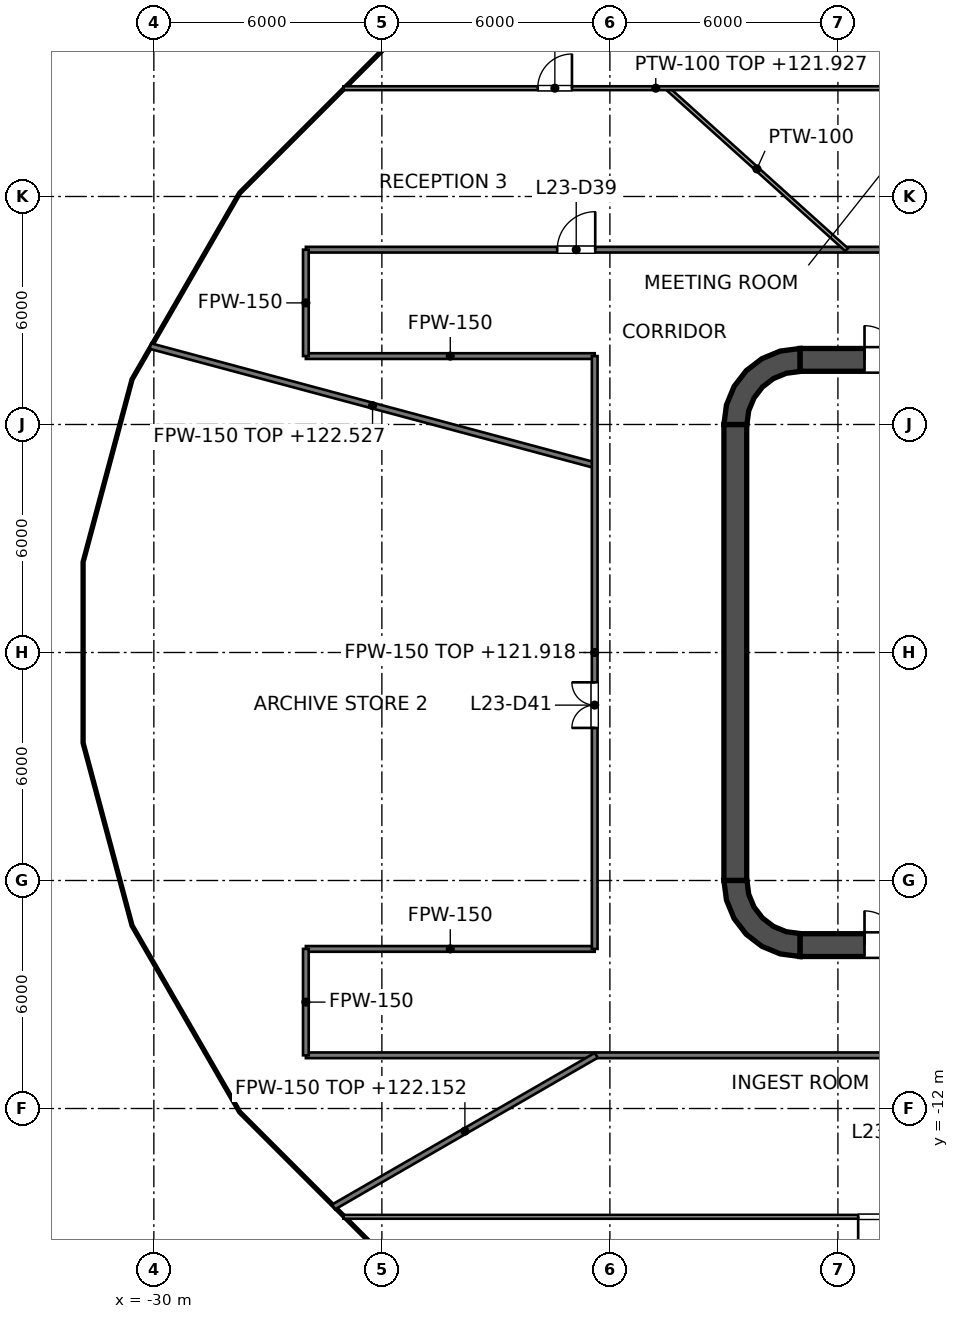
"""IFC4 building model, lengths in metres.
Left out: names, types, materials, properties, quantities, classifications, styles, units other than length and angle.
Written with IfcOpenShell. Run it as: python <this file> out.ifc"""

import sys

from ifc_helpers import new_model, si_unit, direction, frame, frame_2d, origin, place, context, subcontext, project, spatial, polyline, rectangle, outline, extrude, element, fill, save


model = new_model("IFC4")
c1 = context("Model", 3, precision=1e-05, world=origin(), true_north=direction((0.0, 1.0)))
c2 = subcontext(c1, "Body", "Model", "MODEL_VIEW")
j1 = project(units=[si_unit("LENGTHUNIT", "METRE"), si_unit("PLANEANGLEUNIT", "RADIAN")], contexts=[c1])
p1 = place(None, origin())
s1 = spatial("IfcSite", under=j1, at=p1, CompositionType="ELEMENT")
p2 = place(p1, origin())
s2 = spatial("IfcBuilding", under=s1, at=p2, CompositionType="ELEMENT")
p3 = place(p2, frame((0.0, 0.0, 118.8)))
s3 = spatial("IfcBuildingStorey", under=s2, at=p3, CompositionType="ELEMENT", Elevation=118.8)
p4 = place(p3, frame((-13.0, 7.7, 0.0), z_axis=(0.0, 0.0, 1.0), x_axis=(1.0, 0.0, 0.0)))
e1 = element("IfcWall", 1, at=p4, inside=s3, PredefinedType="SHEAR", context=c2, shape_type="SweptSolid", body=[
    extrude(rectangle(XDim=26.0, YDim=0.6, at=frame_2d((13.0, 0.0))), origin(), (0.0, 0.0, 1.0), 4.2),
])
p5 = place(p4, frame((1.7, 0.0, 0.0)))
e2 = element("IfcOpeningElement", 2, at=p5, cuts=e1, PredefinedType="OPENING", context=c2, shape_type="SweptSolid", body=[
    extrude(rectangle(XDim=1.8, YDim=2.1, at=frame_2d((0.9, 1.05))), frame((0.0, 0.3, 0.0), z_axis=(0.0, -1.0, 0.0), x_axis=(1.0, 0.0, 0.0)), (0.0, 0.0, 1.0), 0.6),
])
p6 = place(p4, frame((22.5, 0.0, 0.0)))
e3 = element("IfcOpeningElement", 3, at=p6, cuts=e1, PredefinedType="OPENING", context=c2, shape_type="SweptSolid", body=[
    extrude(rectangle(XDim=1.8, YDim=2.1, at=frame_2d((0.9, 1.05))), frame((0.0, 0.3, 0.0), z_axis=(0.0, -1.0, 0.0), x_axis=(1.0, 0.0, 0.0)), (0.0, 0.0, 1.0), 0.6),
])
p7 = place(p3, frame((-13.0, -7.7, 0.0), z_axis=(0.0, 0.0, 1.0), x_axis=(1.0, 0.0, 0.0)))
e4 = element("IfcWall", 4, at=p7, inside=s3, PredefinedType="SHEAR", context=c2, shape_type="SweptSolid", body=[
    extrude(rectangle(XDim=26.0, YDim=0.6, at=frame_2d((13.0, 0.0))), origin(), (0.0, 0.0, 1.0), 4.2),
])
p8 = place(p7, frame((1.7, 0.0, 0.0)))
e5 = element("IfcOpeningElement", 5, at=p8, cuts=e4, PredefinedType="OPENING", context=c2, shape_type="SweptSolid", body=[
    extrude(rectangle(XDim=1.8, YDim=2.1, at=frame_2d((0.9, 1.05))), frame((0.0, 0.3, 0.0), z_axis=(0.0, -1.0, 0.0), x_axis=(1.0, 0.0, 0.0)), (0.0, 0.0, 1.0), 0.6),
])
p9 = place(p7, frame((22.5, 0.0, 0.0)))
e6 = element("IfcOpeningElement", 6, at=p9, cuts=e4, PredefinedType="OPENING", context=c2, shape_type="SweptSolid", body=[
    extrude(rectangle(XDim=1.8, YDim=2.1, at=frame_2d((0.9, 1.05))), frame((0.0, 0.3, 0.0), z_axis=(0.0, -1.0, 0.0), x_axis=(1.0, 0.0, 0.0)), (0.0, 0.0, 1.0), 0.6),
])
p10 = place(p3, frame((-14.7, -6.0, 0.0), z_axis=(0.0, 0.0, 1.0), x_axis=(0.0, 1.0, 0.0)))
e7 = element("IfcWall", 7, at=p10, inside=s3, PredefinedType="SHEAR", context=c2, shape_type="SweptSolid", body=[
    extrude(rectangle(XDim=12.0, YDim=0.6, at=frame_2d((6.0, 0.0))), origin(), (0.0, 0.0, 1.0), 4.2),
])
p11 = place(p3, origin())
e8 = element("IfcWall", 8, at=p11, inside=s3, PredefinedType="SHEAR", context=c2, shape_type="SweptSolid", body=[
    extrude(outline(polyline([(-15.0, 6.0), (-14.395, 6.0), (-14.347, 6.361), (-14.208, 6.698), (-13.986, 6.986), (-13.698, 7.208), (-13.361, 7.347), (-13.0, 7.395), (-13.0, 8.0), (-13.518, 7.932), (-14.0, 7.732), (-14.414, 7.414), (-14.732, 7.0), (-14.932, 6.518), (-15.0, 6.0)])), origin(), (0.0, 0.0, 1.0), 4.2),
])
e9 = element("IfcWall", 9, at=p11, inside=s3, PredefinedType="SHEAR", context=c2, shape_type="SweptSolid", body=[
    extrude(outline(polyline([(-13.0, -8.0), (-13.0, -7.395), (-13.361, -7.347), (-13.698, -7.208), (-13.986, -6.986), (-14.208, -6.698), (-14.347, -6.361), (-14.395, -6.0), (-15.0, -6.0), (-14.932, -6.518), (-14.732, -7.0), (-14.414, -7.414), (-14.0, -7.732), (-13.518, -7.932), (-13.0, -8.0)])), origin(), (0.0, 0.0, 1.0), 4.2),
])
p12 = place(p3, frame((-11.8, -7.4, 0.0), z_axis=(0.0, 0.0, 1.0), x_axis=(0.0, 1.0, 0.0)))
e10 = element("IfcWall", 10, at=p12, inside=s3, PredefinedType="SOLIDWALL", context=c2, shape_type="SweptSolid", body=[
    extrude(rectangle(XDim=14.8, YDim=0.4, at=frame_2d((7.4, 0.0))), origin(), (0.0, 0.0, 1.0), 4.05),
])
p13 = place(p12, frame((11.2, 0.0, 0.0)))
e11 = element("IfcOpeningElement", 11, at=p13, cuts=e10, PredefinedType="OPENING", context=c2, shape_type="SweptSolid", body=[
    extrude(rectangle(XDim=1.1, YDim=2.1, at=frame_2d((0.55, 1.05))), frame((0.0, 0.2, 0.0), z_axis=(0.0, -1.0, 0.0), x_axis=(1.0, 0.0, 0.0)), (0.0, 0.0, 1.0), 0.4),
])
p14 = place(p12, frame((8.3, 0.0, 0.0)))
e12 = element("IfcOpeningElement", 12, at=p14, cuts=e10, PredefinedType="OPENING", context=c2, shape_type="SweptSolid", body=[
    extrude(rectangle(XDim=1.1, YDim=2.1, at=frame_2d((0.55, 1.05))), frame((0.0, 0.2, 0.0), z_axis=(0.0, -1.0, 0.0), x_axis=(1.0, 0.0, 0.0)), (0.0, 0.0, 1.0), 0.4),
])
p15 = place(p12, frame((5.4, 0.0, 0.0)))
e13 = element("IfcOpeningElement", 13, at=p15, cuts=e10, PredefinedType="OPENING", context=c2, shape_type="SweptSolid", body=[
    extrude(rectangle(XDim=1.1, YDim=2.1, at=frame_2d((0.55, 1.05))), frame((0.0, 0.2, 0.0), z_axis=(0.0, -1.0, 0.0), x_axis=(1.0, 0.0, 0.0)), (0.0, 0.0, 1.0), 0.4),
])
p16 = place(p12, frame((13.552, 0.0, 0.0)))
e14 = element("IfcOpeningElement", 14, at=p16, cuts=e10, PredefinedType="OPENING", context=c2, shape_type="SweptSolid", body=[
    extrude(rectangle(XDim=0.9, YDim=2.1, at=frame_2d((0.45, 1.05))), frame((0.0, 0.2, 0.0), z_axis=(0.0, -1.0, 0.0), x_axis=(1.0, 0.0, 0.0)), (0.0, 0.0, 1.0), 0.4),
])
p17 = place(p12, frame((0.347, 0.0, 0.0)))
e15 = element("IfcOpeningElement", 15, at=p17, cuts=e10, PredefinedType="OPENING", context=c2, shape_type="SweptSolid", body=[
    extrude(rectangle(XDim=0.9, YDim=2.1, at=frame_2d((0.45, 1.05))), frame((0.0, 0.2, 0.0), z_axis=(0.0, -1.0, 0.0), x_axis=(1.0, 0.0, 0.0)), (0.0, 0.0, 1.0), 0.4),
])
e16 = element("IfcWall", 16, at=p11, inside=s3, PredefinedType="SOLIDWALL", context=c2, shape_type="SweptSolid", body=[
    extrude(outline(polyline([(-12.0, -5.925), (-12.0, -5.675), (-14.15, -5.675), (-14.15, -3.025), (-12.0, -3.025), (-12.0, -2.775), (-14.15, -2.775), (-14.15, -0.125), (-12.0, -0.125), (-12.0, 0.125), (-14.15, 0.125), (-14.15, 2.775), (-12.0, 2.775), (-12.0, 3.025), (-14.15, 3.025), (-14.15, 5.675), (-12.0, 5.675), (-12.0, 5.925), (-14.15, 5.925), (-14.4, 5.925), (-14.4, 5.675), (-14.4, 3.025), (-14.4, 2.775), (-14.4, 0.125), (-14.4, -0.125), (-14.4, -2.775), (-14.4, -3.025), (-14.4, -5.675), (-14.4, -5.925), (-14.15, -5.925), (-12.0, -5.925)])), origin(), (0.0, 0.0, 1.0), 4.05),
])
p18 = place(p3, frame((-30.091, 8.063, 0.0), z_axis=(0.0, 0.0, 1.0), x_axis=(0.965917167339, -0.258851358583, 0.0)))
e17 = element("IfcWall", 17, at=p18, inside=s3, PredefinedType="PARTITIONING", context=c2, shape_type="SweptSolid", body=[
    extrude(rectangle(XDim=12.104, YDim=0.15, at=frame_2d((6.052, 0.0))), origin(), (0.0, 0.0, 1.0), 3.727),
])
p19 = place(p3, frame((-26.0, -10.6, 0.0), z_axis=(0.0, 0.0, 1.0), x_axis=(1.0, 0.0, 0.0)))
e18 = element("IfcWall", 18, at=p19, inside=s3, PredefinedType="PARTITIONING", context=c2, shape_type="SweptSolid", body=[
    extrude(rectangle(XDim=52.0, YDim=0.15, at=frame_2d((26.0, 0.0))), origin(), (0.0, 0.0, 1.0), 3.127),
])
p20 = place(p19, frame((17.62, 0.0, 0.0)))
e19 = element("IfcOpeningElement", 19, at=p20, cuts=e18, PredefinedType="OPENING", context=c2, shape_type="SweptSolid", body=[
    extrude(rectangle(XDim=1.2, YDim=2.1, at=frame_2d((0.6, 1.05))), frame((0.0, 0.075, 0.0), z_axis=(0.0, -1.0, 0.0), x_axis=(1.0, 0.0, 0.0)), (0.0, 0.0, 1.0), 0.15),
])
p21 = place(p19, frame((30.25, 0.0, 0.0)))
e20 = element("IfcOpeningElement", 20, at=p21, cuts=e18, PredefinedType="OPENING", context=c2, shape_type="SweptSolid", body=[
    extrude(rectangle(XDim=1.0, YDim=2.1, at=frame_2d((0.5, 1.05))), frame((0.0, 0.075, 0.0), z_axis=(0.0, -1.0, 0.0), x_axis=(1.0, 0.0, 0.0)), (0.0, 0.0, 1.0), 0.15),
])
p22 = place(p19, frame((34.989, 0.0, 0.0)))
e21 = element("IfcOpeningElement", 21, at=p22, cuts=e18, PredefinedType="OPENING", context=c2, shape_type="SweptSolid", body=[
    extrude(rectangle(XDim=1.0, YDim=2.1, at=frame_2d((0.5, 1.05))), frame((0.0, 0.075, 0.0), z_axis=(0.0, -1.0, 0.0), x_axis=(1.0, 0.0, 0.0)), (0.0, 0.0, 1.0), 0.15),
])
p23 = place(p19, frame((44.658, 0.0, 0.0)))
e22 = element("IfcOpeningElement", 22, at=p23, cuts=e18, PredefinedType="OPENING", context=c2, shape_type="SweptSolid", body=[
    extrude(rectangle(XDim=1.0, YDim=2.1, at=frame_2d((0.5, 1.05))), frame((0.0, 0.075, 0.0), z_axis=(0.0, -1.0, 0.0), x_axis=(1.0, 0.0, 0.0)), (0.0, 0.0, 1.0), 0.15),
])
for number, where, z_axis, x_axis in (
    (23, (-26.0, -7.8, 0.0), (0.0, 0.0, 1.0), (1.0, 0.0, 0.0)),
    (24, (-26.0, 7.8, 0.0), (0.0, 0.0, 1.0), (1.0, 0.0, 0.0)),
):
    element("IfcWall", number, at=place(p3, frame(where, z_axis=z_axis, x_axis=x_axis)), inside=s3, PredefinedType="PARTITIONING", context=c2, shape_type="SweptSolid", body=[
        extrude(rectangle(XDim=7.6, YDim=0.15, at=frame_2d((3.8, 0.0))), origin(), (0.0, 0.0, 1.0), 3.276),
    ])
p24 = place(p3, frame((-26.0, 10.6, 0.0), z_axis=(0.0, 0.0, 1.0), x_axis=(1.0, 0.0, 0.0)))
e25 = element("IfcWall", 25, at=p24, inside=s3, PredefinedType="PARTITIONING", context=c2, shape_type="SweptSolid", body=[
    extrude(rectangle(XDim=52.0, YDim=0.15, at=frame_2d((26.0, 0.0))), origin(), (0.0, 0.0, 1.0), 3.127),
])
p25 = place(p24, frame((44.052, 0.0, 0.0)))
e26 = element("IfcOpeningElement", 26, at=p25, cuts=e25, PredefinedType="OPENING", context=c2, shape_type="SweptSolid", body=[
    extrude(rectangle(XDim=1.2, YDim=2.1, at=frame_2d((0.6, 1.05))), frame((0.0, 0.075, 0.0), z_axis=(0.0, -1.0, 0.0), x_axis=(1.0, 0.0, 0.0)), (0.0, 0.0, 1.0), 0.15),
])
p26 = place(p24, frame((35.166, 0.0, 0.0)))
e27 = element("IfcOpeningElement", 27, at=p26, cuts=e25, PredefinedType="OPENING", context=c2, shape_type="SweptSolid", body=[
    extrude(rectangle(XDim=1.0, YDim=2.1, at=frame_2d((0.5, 1.05))), frame((0.0, 0.075, 0.0), z_axis=(0.0, -1.0, 0.0), x_axis=(1.0, 0.0, 0.0)), (0.0, 0.0, 1.0), 0.15),
])
p27 = place(p24, frame((32.68, 0.0, 0.0)))
e28 = element("IfcOpeningElement", 28, at=p27, cuts=e25, PredefinedType="OPENING", context=c2, shape_type="SweptSolid", body=[
    extrude(rectangle(XDim=1.0, YDim=2.1, at=frame_2d((0.5, 1.05))), frame((0.0, 0.075, 0.0), z_axis=(0.0, -1.0, 0.0), x_axis=(1.0, 0.0, 0.0)), (0.0, 0.0, 1.0), 0.15),
])
p28 = place(p24, frame((28.51, 0.0, 0.0)))
e29 = element("IfcOpeningElement", 29, at=p28, cuts=e25, PredefinedType="OPENING", context=c2, shape_type="SweptSolid", body=[
    extrude(rectangle(XDim=1.0, YDim=2.1, at=frame_2d((0.5, 1.05))), frame((0.0, 0.075, 0.0), z_axis=(0.0, -1.0, 0.0), x_axis=(1.0, 0.0, 0.0)), (0.0, 0.0, 1.0), 0.15),
])
p29 = place(p24, frame((22.49, 0.0, 0.0)))
e30 = element("IfcOpeningElement", 30, at=p29, cuts=e25, PredefinedType="OPENING", context=c2, shape_type="SweptSolid", body=[
    extrude(rectangle(XDim=1.0, YDim=2.1, at=frame_2d((0.5, 1.05))), frame((0.0, 0.075, 0.0), z_axis=(0.0, -1.0, 0.0), x_axis=(1.0, 0.0, 0.0)), (0.0, 0.0, 1.0), 0.15),
])
p30 = place(p24, frame((16.554, 0.0, 0.0)))
e31 = element("IfcOpeningElement", 31, at=p30, cuts=e25, PredefinedType="OPENING", context=c2, shape_type="SweptSolid", body=[
    extrude(rectangle(XDim=1.0, YDim=2.1, at=frame_2d((0.5, 1.05))), frame((0.0, 0.075, 0.0), z_axis=(0.0, -1.0, 0.0), x_axis=(1.0, 0.0, 0.0)), (0.0, 0.0, 1.0), 0.15),
])
p31 = place(p24, frame((6.614, 0.0, 0.0)))
e32 = element("IfcOpeningElement", 32, at=p31, cuts=e25, PredefinedType="OPENING", context=c2, shape_type="SweptSolid", body=[
    extrude(rectangle(XDim=1.0, YDim=2.1, at=frame_2d((0.5, 1.05))), frame((0.0, 0.075, 0.0), z_axis=(0.0, -1.0, 0.0), x_axis=(1.0, 0.0, 0.0)), (0.0, 0.0, 1.0), 0.15),
])
p32 = place(p3, frame((-25.272, -14.591, 0.0), z_axis=(0.0, 0.0, 1.0), x_axis=(0.866041960816, 0.499971321283, 0.0)))
e33 = element("IfcWall", 33, at=p32, inside=s3, PredefinedType="PARTITIONING", context=c2, shape_type="SweptSolid", body=[
    extrude(rectangle(XDim=7.982, YDim=0.15, at=frame_2d((3.991, 0.0))), origin(), (0.0, 0.0, 1.0), 3.352),
])
p33 = place(p3, frame((-18.4, -7.8, 0.0), z_axis=(0.0, 0.0, 1.0), x_axis=(0.0, 1.0, 0.0)))
e34 = element("IfcWall", 34, at=p33, inside=s3, PredefinedType="PARTITIONING", context=c2, shape_type="SweptSolid", body=[
    extrude(rectangle(XDim=15.6, YDim=0.15, at=frame_2d((7.8, 0.0))), origin(), (0.0, 0.0, 1.0), 3.118),
])
p34 = place(p33, frame((5.815, 0.0, 0.0)))
e35 = element("IfcOpeningElement", 35, at=p34, cuts=e34, PredefinedType="OPENING", context=c2, shape_type="SweptSolid", body=[
    extrude(rectangle(XDim=1.2, YDim=2.1, at=frame_2d((0.6, 1.05))), frame((0.0, 0.075, 0.0), z_axis=(0.0, -1.0, 0.0), x_axis=(1.0, 0.0, 0.0)), (0.0, 0.0, 1.0), 0.15),
])
for number, where, z_axis, x_axis in (
    (36, (-26.0, -10.6, 0.0), (0.0, 0.0, 1.0), (0.0, 1.0, 0.0)),
    (37, (-26.0, 7.8, 0.0), (0.0, 0.0, 1.0), (0.0, 1.0, 0.0)),
):
    element("IfcWall", number, at=place(p3, frame(where, z_axis=z_axis, x_axis=x_axis)), inside=s3, PredefinedType="PARTITIONING", context=c2, shape_type="SweptSolid", body=[
        extrude(rectangle(XDim=2.8, YDim=0.15, at=frame_2d((1.4, 0.0))), origin(), (0.0, 0.0, 1.0), 3.276),
    ])
p35 = place(p3, frame((-16.492, 14.85, 0.0), z_axis=(0.0, 0.0, 1.0), x_axis=(0.74313548605, -0.669140978698, 0.0)))
e38 = element("IfcWall", 38, at=p35, inside=s3, PredefinedType="PARTITIONING", context=c2, shape_type="SweptSolid", body=[
    extrude(rectangle(XDim=6.351, YDim=0.1, at=frame_2d((3.176, 0.0))), origin(), (0.0, 0.0, 1.0), 4.05),
])
p36 = place(p3, frame((-25.013, -14.85, 0.0), z_axis=(0.0, 0.0, 1.0), x_axis=(1.0, 0.0, 0.0)))
e39 = element("IfcWall", 39, at=p36, inside=s3, PredefinedType="PARTITIONING", context=c2, shape_type="SweptSolid", body=[
    extrude(rectangle(XDim=50.026, YDim=0.1, at=frame_2d((25.013, 0.0))), origin(), (0.0, 0.0, 1.0), 3.127),
])
p37 = place(p36, frame((13.546, 0.0, 0.0)))
e40 = element("IfcOpeningElement", 40, at=p37, cuts=e39, PredefinedType="OPENING", context=c2, shape_type="SweptSolid", body=[
    extrude(rectangle(XDim=1.8, YDim=2.1, at=frame_2d((0.9, 1.05))), frame((0.0, 0.05, 0.0), z_axis=(0.0, -1.0, 0.0), x_axis=(1.0, 0.0, 0.0)), (0.0, 0.0, 1.0), 0.1),
])
p38 = place(p36, frame((43.98, 0.0, 0.0)))
e41 = element("IfcOpeningElement", 41, at=p38, cuts=e39, PredefinedType="OPENING", context=c2, shape_type="SweptSolid", body=[
    extrude(rectangle(XDim=0.9, YDim=2.1, at=frame_2d((0.45, 1.05))), frame((0.0, 0.05, 0.0), z_axis=(0.0, -1.0, 0.0), x_axis=(1.0, 0.0, 0.0)), (0.0, 0.0, 1.0), 0.1),
])
p39 = place(p3, frame((-25.013, 14.85, 0.0), z_axis=(0.0, 0.0, 1.0), x_axis=(1.0, 0.0, 0.0)))
e42 = element("IfcWall", 42, at=p39, inside=s3, PredefinedType="PARTITIONING", context=c2, shape_type="SweptSolid", body=[
    extrude(rectangle(XDim=16.44, YDim=0.1, at=frame_2d((8.22, 0.0))), origin(), (0.0, 0.0, 1.0), 3.127),
])
p40 = place(p39, frame((5.115, 0.0, 0.0)))
e43 = element("IfcOpeningElement", 43, at=p40, cuts=e42, PredefinedType="OPENING", context=c2, shape_type="SweptSolid", body=[
    extrude(rectangle(XDim=0.9, YDim=2.1, at=frame_2d((0.45, 1.05))), frame((0.0, 0.05, 0.0), z_axis=(0.0, -1.0, 0.0), x_axis=(1.0, 0.0, 0.0)), (0.0, 0.0, 1.0), 0.1),
])
p41 = place(p13, origin())
e44 = element("IfcDoor", 44, at=p41, inside=s3, OperationType="DOUBLE_DOOR_SLIDING", PredefinedType="DOOR", context=c2, shape_type="SweptSolid", body=[
    extrude(rectangle(XDim=1.1, YDim=2.1, at=frame_2d((0.55, 1.05))), frame((0.0, 0.025, 0.0), z_axis=(0.0, -1.0, 0.0), x_axis=(1.0, 0.0, 0.0)), (0.0, 0.0, 1.0), 0.05),
])
fill(e11, e44)
p42 = place(p14, origin())
e45 = element("IfcDoor", 45, at=p42, inside=s3, OperationType="DOUBLE_DOOR_SLIDING", PredefinedType="DOOR", context=c2, shape_type="SweptSolid", body=[
    extrude(rectangle(XDim=1.1, YDim=2.1, at=frame_2d((0.55, 1.05))), frame((0.0, 0.025, 0.0), z_axis=(0.0, -1.0, 0.0), x_axis=(1.0, 0.0, 0.0)), (0.0, 0.0, 1.0), 0.05),
])
fill(e12, e45)
p43 = place(p15, origin())
e46 = element("IfcDoor", 46, at=p43, inside=s3, OperationType="DOUBLE_DOOR_SLIDING", PredefinedType="DOOR", context=c2, shape_type="SweptSolid", body=[
    extrude(rectangle(XDim=1.1, YDim=2.1, at=frame_2d((0.55, 1.05))), frame((0.0, 0.025, 0.0), z_axis=(0.0, -1.0, 0.0), x_axis=(1.0, 0.0, 0.0)), (0.0, 0.0, 1.0), 0.05),
])
fill(e13, e46)
p44 = place(p16, origin())
e47 = element("IfcDoor", 47, at=p44, inside=s3, OperationType="SINGLE_SWING_LEFT", PredefinedType="DOOR", context=c2, shape_type="SweptSolid", body=[
    extrude(rectangle(XDim=0.9, YDim=2.1, at=frame_2d((0.45, 1.05))), frame((0.0, 0.025, 0.0), z_axis=(0.0, -1.0, 0.0), x_axis=(1.0, 0.0, 0.0)), (0.0, 0.0, 1.0), 0.05),
])
fill(e14, e47)
p45 = place(p17, origin())
e48 = element("IfcDoor", 48, at=p45, inside=s3, OperationType="SINGLE_SWING_LEFT", PredefinedType="DOOR", context=c2, shape_type="SweptSolid", body=[
    extrude(rectangle(XDim=0.9, YDim=2.1, at=frame_2d((0.45, 1.05))), frame((0.0, 0.025, 0.0), z_axis=(0.0, -1.0, 0.0), x_axis=(1.0, 0.0, 0.0)), (0.0, 0.0, 1.0), 0.05),
])
fill(e15, e48)
p46 = place(p5, origin())
e49 = element("IfcDoor", 49, at=p46, inside=s3, OperationType="DOUBLE_DOOR_SINGLE_SWING", PredefinedType="DOOR", context=c2, shape_type="SweptSolid", body=[
    extrude(rectangle(XDim=1.8, YDim=2.1, at=frame_2d((0.9, 1.05))), frame((0.0, 0.025, 0.0), z_axis=(0.0, -1.0, 0.0), x_axis=(1.0, 0.0, 0.0)), (0.0, 0.0, 1.0), 0.05),
])
fill(e2, e49)
p47 = place(p8, origin())
e50 = element("IfcDoor", 50, at=p47, inside=s3, OperationType="DOUBLE_DOOR_SINGLE_SWING", PredefinedType="DOOR", context=c2, shape_type="SweptSolid", body=[
    extrude(rectangle(XDim=1.8, YDim=2.1, at=frame_2d((0.9, 1.05))), frame((0.0, 0.025, 0.0), z_axis=(0.0, -1.0, 0.0), x_axis=(1.0, 0.0, 0.0)), (0.0, 0.0, 1.0), 0.05),
])
fill(e5, e50)
p48 = place(p37, origin())
e51 = element("IfcDoor", 51, at=p48, inside=s3, OperationType="DOUBLE_DOOR_SINGLE_SWING", PredefinedType="DOOR", context=c2, shape_type="SweptSolid", body=[
    extrude(rectangle(XDim=1.8, YDim=2.1, at=frame_2d((0.9, 1.05))), frame((0.0, 0.025, 0.0), z_axis=(0.0, -1.0, 0.0), x_axis=(1.0, 0.0, 0.0)), (0.0, 0.0, 1.0), 0.05),
])
fill(e40, e51)
p49 = place(p31, origin())
e52 = element("IfcDoor", 52, at=p49, inside=s3, OperationType="SINGLE_SWING_RIGHT", PredefinedType="DOOR", context=c2, shape_type="SweptSolid", body=[
    extrude(rectangle(XDim=1.0, YDim=2.1, at=frame_2d((0.5, 1.05))), frame((0.0, 0.025, 0.0), z_axis=(0.0, -1.0, 0.0), x_axis=(1.0, 0.0, 0.0)), (0.0, 0.0, 1.0), 0.05),
])
fill(e32, e52)
p50 = place(p40, origin())
e53 = element("IfcDoor", 53, at=p50, inside=s3, OperationType="SINGLE_SWING_RIGHT", PredefinedType="DOOR", context=c2, shape_type="SweptSolid", body=[
    extrude(rectangle(XDim=0.9, YDim=2.1, at=frame_2d((0.45, 1.05))), frame((0.0, 0.025, 0.0), z_axis=(0.0, -1.0, 0.0), x_axis=(1.0, 0.0, 0.0)), (0.0, 0.0, 1.0), 0.05),
])
fill(e43, e53)
p51 = place(p34, origin())
e54 = element("IfcDoor", 54, at=p51, inside=s3, OperationType="DOUBLE_DOOR_SINGLE_SWING", PredefinedType="DOOR", context=c2, shape_type="SweptSolid", body=[
    extrude(rectangle(XDim=1.2, YDim=2.1, at=frame_2d((0.6, 1.05))), frame((0.0, 0.025, 0.0), z_axis=(0.0, -1.0, 0.0), x_axis=(1.0, 0.0, 0.0)), (0.0, 0.0, 1.0), 0.05),
])
fill(e35, e54)
save(model, sys.argv[1])
